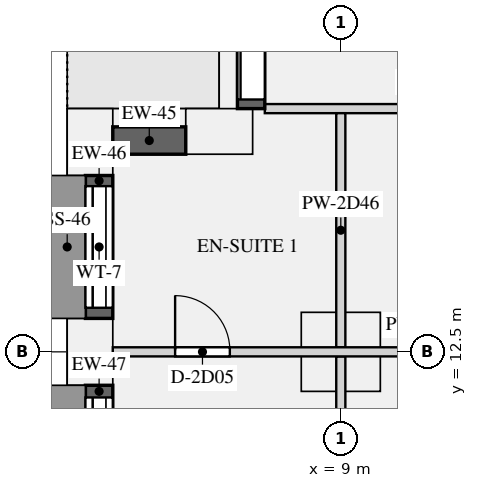
"""IFC4 building model, lengths in metres.
Left out: names, types, materials, properties, quantities, classifications, styles, units other than length and angle.
Written with IfcOpenShell. Run it as: python <this file> out.ifc"""

import sys

from ifc_helpers import new_model, si_unit, direction, frame, frame_2d, origin, origin_2d, place, context, subcontext, project, spatial, rectangle, extrude, element, fill, save


model = new_model("IFC4")
c1 = context("Model", 3, precision=1e-05, world=origin(), true_north=direction((0.0, 1.0)))
c2 = subcontext(c1, "Body", "Model", "MODEL_VIEW")
j1 = project(units=[si_unit("LENGTHUNIT", "METRE"), si_unit("PLANEANGLEUNIT", "RADIAN")], contexts=[c1])
p1 = place(None, origin())
s1 = spatial("IfcSite", under=j1, at=p1, CompositionType="ELEMENT")
p2 = place(p1, origin())
s2 = spatial("IfcBuilding", under=s1, at=p2, CompositionType="ELEMENT")
p3 = place(p2, frame((0.0, 0.0, 111.9)))
s3 = spatial("IfcBuildingStorey", under=s2, at=p3, CompositionType="ELEMENT", Elevation=111.9)
for number, where, z_axis, x_axis in (
    (1, (7.0, 16.125, 0.0), (0.0, 0.0, 1.0), (-1.0, 0.0, 0.0)),
    (2, (4.875, 15.95, 0.0), (0.0, 0.0, 1.0), (0.0, -1.0, 0.0)),
    (3, (4.875, 12.5, 0.0), (0.0, 0.0, 1.0), (0.0, -1.0, 0.0)),
):
    element("IfcColumn", number, at=place(p3, frame(where, z_axis=z_axis, x_axis=x_axis)), inside=s3, PredefinedType="USERDEFINED", context=c2, shape_type="SweptSolid", body=[
        extrude(rectangle(XDim=1.1, YDim=0.75, at=origin_2d()), origin(), (0.0, 0.0, 1.0), 3.15),
    ])
p4 = place(p3, frame((9.0, 12.5, 0.0), z_axis=(0.0, 0.0, 1.0), x_axis=(1.0, 0.0, 0.0)))
e4 = element("IfcColumn", 4, at=p4, inside=s3, PredefinedType="COLUMN", context=c2, shape_type="SweptSolid", body=[
    extrude(rectangle(XDim=1.3, YDim=1.3, at=origin_2d()), origin(), (0.0, 0.0, 1.0), 3.15),
])
p5 = place(p3, frame((7.525, 19.95, 0.0), z_axis=(0.0, 0.0, 1.0), x_axis=(0.0, -1.0, 0.0)))
e5 = element("IfcWall", 5, at=p5, inside=s3, PredefinedType="SOLIDWALL", context=c2, shape_type="SweptSolid", body=[
    extrude(rectangle(XDim=3.45, YDim=0.45, at=frame_2d((1.725, 0.0))), origin(), (0.0, 0.0, 1.0), 2.83),
])
p6 = place(p5, frame((0.15, 0.0, 0.0)))
e6 = element("IfcOpeningElement", 6, at=p6, cuts=e5, PredefinedType="OPENING", context=c2, shape_type="SweptSolid", body=[
    extrude(rectangle(XDim=3.15, YDim=2.3, at=frame_2d((1.575, 1.15))), frame((0.0, 0.235, 0.0), z_axis=(0.0, -1.0, 0.0), x_axis=(1.0, 0.0, 0.0)), (0.0, 0.0, 1.0), 0.47),
])
p7 = place(p3, frame((6.45, 15.975, 0.9), z_axis=(0.0, 0.0, 1.0), x_axis=(-1.0, 0.0, 0.0)))
e7 = element("IfcWall", 7, at=p7, inside=s3, PredefinedType="SOLIDWALL", context=c2, shape_type="SweptSolid", body=[
    extrude(rectangle(XDim=1.2, YDim=0.45, at=frame_2d((0.6, 0.0))), origin(), (0.0, 0.0, 1.0), 1.93),
])
p8 = place(p3, frame((5.025, 15.4, 0.9), z_axis=(0.0, 0.0, 1.0), x_axis=(0.0, -1.0, 0.0)))
e8 = element("IfcWall", 8, at=p8, inside=s3, PredefinedType="SOLIDWALL", context=c2, shape_type="SweptSolid", body=[
    extrude(rectangle(XDim=2.35, YDim=0.45, at=frame_2d((1.175, 0.0))), origin(), (0.0, 0.0, 1.0), 1.93),
])
p9 = place(p8, frame((0.175, 0.0, 0.15)))
e9 = element("IfcOpeningElement", 9, at=p9, cuts=e8, PredefinedType="OPENING", context=c2, shape_type="SweptSolid", body=[
    extrude(rectangle(XDim=2.0, YDim=1.5, at=frame_2d((1.0, 0.75))), frame((0.0, 0.235, 0.0), z_axis=(0.0, -1.0, 0.0), x_axis=(1.0, 0.0, 0.0)), (0.0, 0.0, 1.0), 0.47),
])
p10 = place(p3, frame((5.025, 11.95, 0.9), z_axis=(0.0, 0.0, 1.0), x_axis=(0.0, -1.0, 0.0)))
e10 = element("IfcWall", 10, at=p10, inside=s3, PredefinedType="SOLIDWALL", context=c2, shape_type="SweptSolid", body=[
    extrude(rectangle(XDim=2.9, YDim=0.45, at=frame_2d((1.45, 0.0))), origin(), (0.0, 0.0, 1.0), 1.93),
])
p11 = place(p10, frame((0.2, 0.0, 0.15)))
e11 = element("IfcOpeningElement", 11, at=p11, cuts=e10, PredefinedType="OPENING", context=c2, shape_type="SweptSolid", body=[
    extrude(rectangle(XDim=2.5, YDim=1.5, at=frame_2d((1.25, 0.75))), frame((0.0, 0.235, 0.0), z_axis=(0.0, -1.0, 0.0), x_axis=(1.0, 0.0, 0.0)), (0.0, 0.0, 1.0), 0.47),
])
p12 = place(p3, frame((5.25, 12.5, 0.0), z_axis=(0.0, 0.0, 1.0), x_axis=(1.0, 0.0, 0.0)))
e12 = element("IfcWall", 12, at=p12, inside=s3, PredefinedType="PARTITIONING", context=c2, shape_type="SweptSolid", body=[
    extrude(rectangle(XDim=8.325, YDim=0.15, at=frame_2d((4.163, 0.0))), origin(), (0.0, 0.0, 1.0), 2.83),
])
p13 = place(p12, frame((1.025, 0.0, 0.0)))
e13 = element("IfcOpeningElement", 13, at=p13, cuts=e12, PredefinedType="OPENING", context=c2, shape_type="SweptSolid", body=[
    extrude(rectangle(XDim=0.9, YDim=2.1, at=frame_2d((0.45, 1.05))), frame((0.0, 0.085, 0.0), z_axis=(0.0, -1.0, 0.0), x_axis=(1.0, 0.0, 0.0)), (0.0, 0.0, 1.0), 0.17),
])
p14 = place(p3, frame((7.75, 16.5, 0.0), z_axis=(0.0, 0.0, 1.0), x_axis=(1.0, 0.0, 0.0)))
e14 = element("IfcWall", 14, at=p14, inside=s3, PredefinedType="PARTITIONING", context=c2, shape_type="SweptSolid", body=[
    extrude(rectangle(XDim=5.675, YDim=0.15, at=frame_2d((2.837, 0.0))), origin(), (0.0, 0.0, 1.0), 2.83),
])
p15 = place(p3, frame((9.0, 5.25, 0.0), z_axis=(0.0, 0.0, 1.0), x_axis=(0.0, 1.0, 0.0)))
e15 = element("IfcWall", 15, at=p15, inside=s3, PredefinedType="PARTITIONING", context=c2, shape_type="SweptSolid", body=[
    extrude(rectangle(XDim=7.175, YDim=0.15, at=frame_2d((3.587, 0.0))), origin(), (0.0, 0.0, 1.0), 2.83),
])
p16 = place(p15, frame((4.475, 0.0, 0.0)))
e16 = element("IfcOpeningElement", 16, at=p16, cuts=e15, PredefinedType="OPENING", context=c2, shape_type="SweptSolid", body=[
    extrude(rectangle(XDim=0.9, YDim=2.1, at=frame_2d((0.45, 1.05))), frame((0.0, 0.085, 0.0), z_axis=(0.0, -1.0, 0.0), x_axis=(1.0, 0.0, 0.0)), (0.0, 0.0, 1.0), 0.17),
])
p17 = place(p3, frame((9.0, 12.575, 0.0), z_axis=(0.0, 0.0, 1.0), x_axis=(0.0, 1.0, 0.0)))
e17 = element("IfcWall", 17, at=p17, inside=s3, PredefinedType="PARTITIONING", context=c2, shape_type="SweptSolid", body=[
    extrude(rectangle(XDim=3.85, YDim=0.15, at=frame_2d((1.925, 0.0))), origin(), (0.0, 0.0, 1.0), 2.83),
])
p18 = place(p6, origin())
e18 = element("IfcDoor", 18, at=p18, inside=s3, OperationType="SLIDING_TO_LEFT", PredefinedType="DOOR", context=c2, shape_type="SweptSolid", body=[
    extrude(rectangle(XDim=3.15, YDim=2.3, at=frame_2d((1.575, 1.15))), frame((0.0, -0.07, 0.0), z_axis=(0.0, -1.0, 0.0), x_axis=(1.0, 0.0, 0.0)), (0.0, 0.0, 1.0), 0.05),
])
fill(e6, e18)
p19 = place(p9, origin())
e19 = element("IfcWindow", 19, at=p19, inside=s3, PartitioningType="SINGLE_PANEL", PredefinedType="WINDOW", context=c2, shape_type="SweptSolid", body=[
    extrude(rectangle(XDim=2.0, YDim=1.5, at=frame_2d((1.0, 0.75))), frame((0.0, -0.065, 0.0), z_axis=(0.0, -1.0, 0.0), x_axis=(1.0, 0.0, 0.0)), (0.0, 0.0, 1.0), 0.06),
])
fill(e9, e19)
p20 = place(p11, origin())
e20 = element("IfcWindow", 20, at=p20, inside=s3, PartitioningType="SINGLE_PANEL", PredefinedType="WINDOW", context=c2, shape_type="SweptSolid", body=[
    extrude(rectangle(XDim=2.5, YDim=1.5, at=frame_2d((1.25, 0.75))), frame((0.0, -0.065, 0.0), z_axis=(0.0, -1.0, 0.0), x_axis=(1.0, 0.0, 0.0)), (0.0, 0.0, 1.0), 0.06),
])
fill(e11, e20)
p21 = place(p13, origin())
e21 = element("IfcDoor", 21, at=p21, inside=s3, OperationType="SINGLE_SWING_LEFT", PredefinedType="DOOR", context=c2, shape_type="SweptSolid", body=[
    extrude(rectangle(XDim=0.9, YDim=2.1, at=frame_2d((0.45, 1.05))), frame((0.0, 0.025, 0.0), z_axis=(0.0, -1.0, 0.0), x_axis=(1.0, 0.0, 0.0)), (0.0, 0.0, 1.0), 0.05),
])
fill(e13, e21)
save(model, sys.argv[1])
